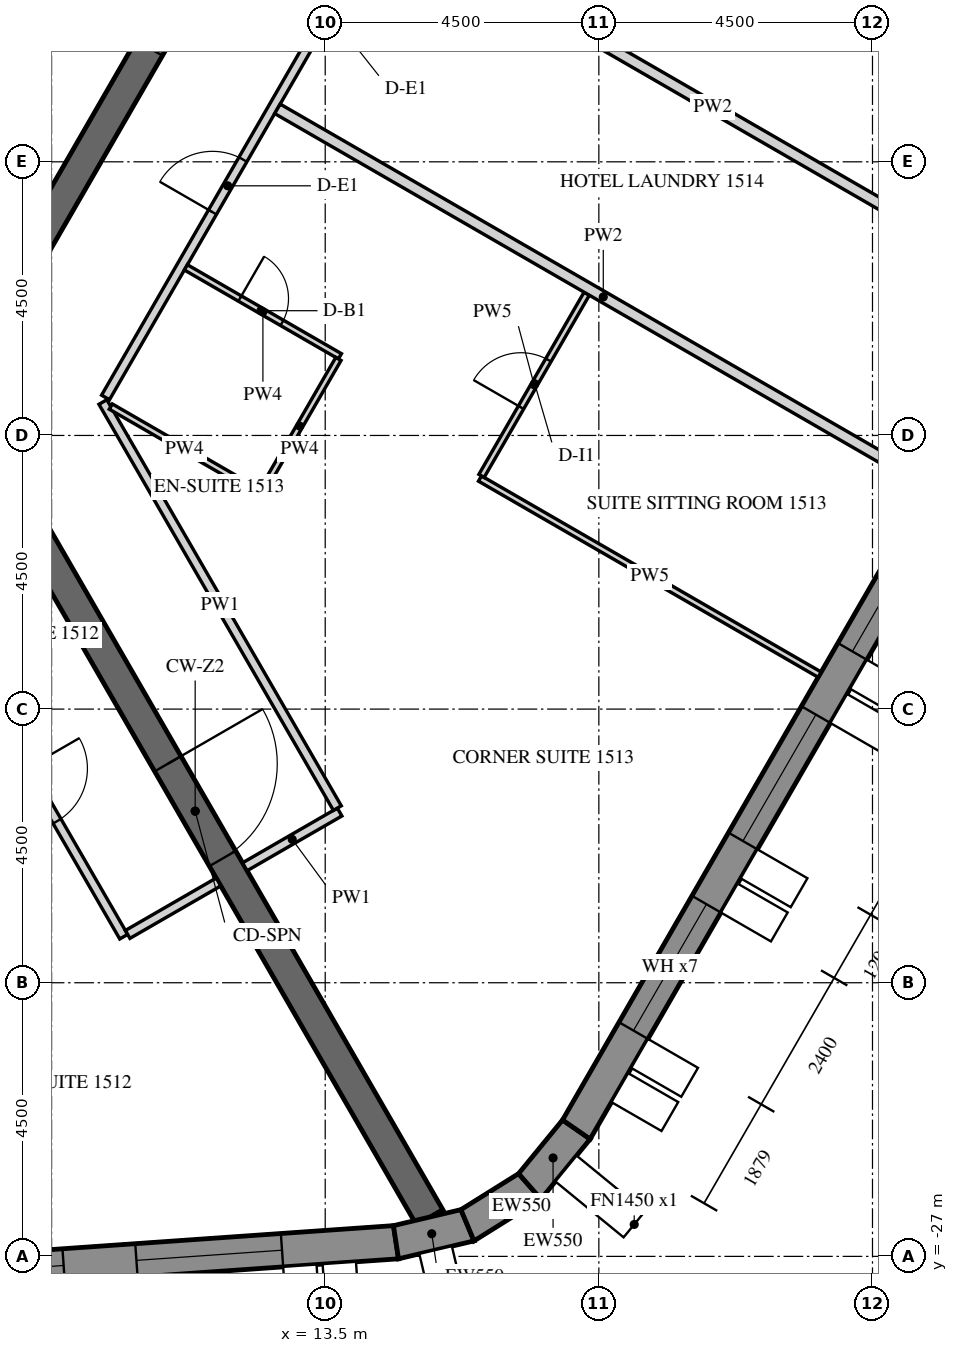
"""IFC4 building model, lengths in metres.
Left out: names, types, materials, properties, quantities, classifications, styles, units other than length and angle.
Written with IfcOpenShell. Run it as: python <this file> out.ifc"""

import sys

from ifc_helpers import new_model, si_unit, direction, frame, frame_2d, origin, place, context, subcontext, project, spatial, polyline, rectangle, outline, extrude, element, fill, save


model = new_model("IFC4")
c1 = context("Model", 3, precision=1e-05, world=origin(), true_north=direction((0.0, 1.0)))
c2 = subcontext(c1, "Body", "Model", "MODEL_VIEW")
j1 = project(units=[si_unit("LENGTHUNIT", "METRE"), si_unit("PLANEANGLEUNIT", "RADIAN")], contexts=[c1])
p1 = place(None, origin())
s1 = spatial("IfcSite", under=j1, at=p1, CompositionType="ELEMENT")
p2 = place(p1, origin())
s2 = spatial("IfcBuilding", under=s1, at=p2, CompositionType="ELEMENT")
p3 = place(p2, frame((0.0, 0.0, 195.6)))
s3 = spatial("IfcBuildingStorey", under=s2, at=p3, CompositionType="ELEMENT", Elevation=195.6)
p4 = place(p3, frame((-13.026, -28.704, -0.15), z_axis=(0.0, 0.0, 1.0), x_axis=(0.99756406806, 0.069756219185, 0.0)))
e1 = element("IfcWall", 1, at=p4, inside=s3, PredefinedType="SOLIDWALL", context=c2, shape_type="SweptSolid", body=[
    extrude(outline(polyline([(-0.026, -0.275), (27.78, -0.275), (27.735, 0.275), (0.026, 0.275), (-0.026, -0.275)])), origin(), (0.0, 0.0, 1.0), 3.9),
])
p5 = place(p4, frame((1.879, 0.0, 1.05)))
e2 = element("IfcOpeningElement", 2, at=p5, cuts=e1, PredefinedType="OPENING", context=c2, shape_type="SweptSolid", body=[
    extrude(rectangle(XDim=2.4, YDim=2.4, at=frame_2d((1.2, 1.2))), frame((0.0, 0.285, 0.0), z_axis=(0.0, -1.0, 0.0), x_axis=(1.0, 0.0, 0.0)), (0.0, 0.0, 1.0), 0.57),
])
p6 = place(p4, frame((5.479, 0.0, 1.05)))
e3 = element("IfcOpeningElement", 3, at=p6, cuts=e1, PredefinedType="OPENING", context=c2, shape_type="SweptSolid", body=[
    extrude(rectangle(XDim=2.4, YDim=2.4, at=frame_2d((1.2, 1.2))), frame((0.0, 0.285, 0.0), z_axis=(0.0, -1.0, 0.0), x_axis=(1.0, 0.0, 0.0)), (0.0, 0.0, 1.0), 0.57),
])
p7 = place(p4, frame((9.079, 0.0, 1.05)))
e4 = element("IfcOpeningElement", 4, at=p7, cuts=e1, PredefinedType="OPENING", context=c2, shape_type="SweptSolid", body=[
    extrude(rectangle(XDim=2.4, YDim=2.4, at=frame_2d((1.2, 1.2))), frame((0.0, 0.285, 0.0), z_axis=(0.0, -1.0, 0.0), x_axis=(1.0, 0.0, 0.0)), (0.0, 0.0, 1.0), 0.57),
])
p8 = place(p4, frame((12.679, 0.0, 1.05)))
e5 = element("IfcOpeningElement", 5, at=p8, cuts=e1, PredefinedType="OPENING", context=c2, shape_type="SweptSolid", body=[
    extrude(rectangle(XDim=2.4, YDim=2.4, at=frame_2d((1.2, 1.2))), frame((0.0, 0.285, 0.0), z_axis=(0.0, -1.0, 0.0), x_axis=(1.0, 0.0, 0.0)), (0.0, 0.0, 1.0), 0.57),
])
p9 = place(p4, frame((16.279, 0.0, 1.05)))
e6 = element("IfcOpeningElement", 6, at=p9, cuts=e1, PredefinedType="OPENING", context=c2, shape_type="SweptSolid", body=[
    extrude(rectangle(XDim=2.4, YDim=2.4, at=frame_2d((1.2, 1.2))), frame((0.0, 0.285, 0.0), z_axis=(0.0, -1.0, 0.0), x_axis=(1.0, 0.0, 0.0)), (0.0, 0.0, 1.0), 0.57),
])
p10 = place(p4, frame((19.879, 0.0, 1.05)))
e7 = element("IfcOpeningElement", 7, at=p10, cuts=e1, PredefinedType="OPENING", context=c2, shape_type="SweptSolid", body=[
    extrude(rectangle(XDim=2.4, YDim=2.4, at=frame_2d((1.2, 1.2))), frame((0.0, 0.285, 0.0), z_axis=(0.0, -1.0, 0.0), x_axis=(1.0, 0.0, 0.0)), (0.0, 0.0, 1.0), 0.57),
])
p11 = place(p4, frame((23.479, 0.0, 1.05)))
e8 = element("IfcOpeningElement", 8, at=p11, cuts=e1, PredefinedType="OPENING", context=c2, shape_type="SweptSolid", body=[
    extrude(rectangle(XDim=2.4, YDim=2.4, at=frame_2d((1.2, 1.2))), frame((0.0, 0.285, 0.0), z_axis=(0.0, -1.0, 0.0), x_axis=(1.0, 0.0, 0.0)), (0.0, 0.0, 1.0), 0.57),
])
p12 = place(p3, frame((14.664, -26.767, -0.15), z_axis=(0.0, 0.0, 1.0), x_axis=(0.973063591128, 0.230536868247, 0.0)))
e9 = element("IfcWall", 9, at=p12, inside=s3, PredefinedType="SOLIDWALL", context=c2, shape_type="SweptSolid", body=[
    extrude(outline(polyline([(-0.022, -0.275), (1.253, -0.275), (1.163, 0.275), (0.022, 0.275), (-0.022, -0.275)])), origin(), (0.0, 0.0, 1.0), 3.9),
])
p13 = place(p3, frame((15.84, -26.489, -0.15), z_axis=(0.0, 0.0, 1.0), x_axis=(0.848009655012, 0.52998077796, 0.0)))
e10 = element("IfcWall", 10, at=p13, inside=s3, PredefinedType="SOLIDWALL", context=c2, shape_type="SweptSolid", body=[
    extrude(outline(polyline([(-0.045, -0.275), (1.253, -0.275), (1.163, 0.275), (0.045, 0.275), (-0.045, -0.275)])), origin(), (0.0, 0.0, 1.0), 3.9),
])
p14 = place(p3, frame((16.864, -25.848, -0.15), z_axis=(0.0, 0.0, 1.0), x_axis=(0.633842757806, 0.773461930787, 0.0)))
e11 = element("IfcWall", 11, at=p14, inside=s3, PredefinedType="SOLIDWALL", context=c2, shape_type="SweptSolid", body=[
    extrude(outline(polyline([(-0.045, -0.275), (1.231, -0.275), (1.186, 0.275), (0.045, 0.275), (-0.045, -0.275)])), origin(), (0.0, 0.0, 1.0), 3.9),
])
p15 = place(p3, frame((17.63, -24.914, -0.15), z_axis=(0.0, 0.0, 1.0), x_axis=(0.499998569178, 0.866026229868, 0.0)))
e12 = element("IfcWall", 12, at=p15, inside=s3, PredefinedType="SOLIDWALL", context=c2, shape_type="SweptSolid", body=[
    extrude(outline(polyline([(-0.022, -0.275), (27.783, -0.275), (27.732, 0.275), (0.022, 0.275), (-0.022, -0.275)])), origin(), (0.0, 0.0, 1.0), 3.9),
])
p16 = place(p15, frame((1.879, 0.0, 1.05)))
e13 = element("IfcOpeningElement", 13, at=p16, cuts=e12, PredefinedType="OPENING", context=c2, shape_type="SweptSolid", body=[
    extrude(rectangle(XDim=2.4, YDim=2.4, at=frame_2d((1.2, 1.2))), frame((0.0, 0.285, 0.0), z_axis=(0.0, -1.0, 0.0), x_axis=(1.0, 0.0, 0.0)), (0.0, 0.0, 1.0), 0.57),
])
p17 = place(p15, frame((5.479, 0.0, 1.05)))
e14 = element("IfcOpeningElement", 14, at=p17, cuts=e12, PredefinedType="OPENING", context=c2, shape_type="SweptSolid", body=[
    extrude(rectangle(XDim=2.4, YDim=2.4, at=frame_2d((1.2, 1.2))), frame((0.0, 0.285, 0.0), z_axis=(0.0, -1.0, 0.0), x_axis=(1.0, 0.0, 0.0)), (0.0, 0.0, 1.0), 0.57),
])
p18 = place(p15, frame((9.079, 0.0, 1.05)))
e15 = element("IfcOpeningElement", 15, at=p18, cuts=e12, PredefinedType="OPENING", context=c2, shape_type="SweptSolid", body=[
    extrude(rectangle(XDim=2.4, YDim=2.4, at=frame_2d((1.2, 1.2))), frame((0.0, 0.285, 0.0), z_axis=(0.0, -1.0, 0.0), x_axis=(1.0, 0.0, 0.0)), (0.0, 0.0, 1.0), 0.57),
])
p19 = place(p15, frame((12.679, 0.0, 1.05)))
e16 = element("IfcOpeningElement", 16, at=p19, cuts=e12, PredefinedType="OPENING", context=c2, shape_type="SweptSolid", body=[
    extrude(rectangle(XDim=2.4, YDim=2.4, at=frame_2d((1.2, 1.2))), frame((0.0, 0.285, 0.0), z_axis=(0.0, -1.0, 0.0), x_axis=(1.0, 0.0, 0.0)), (0.0, 0.0, 1.0), 0.57),
])
p20 = place(p15, frame((16.279, 0.0, 1.05)))
e17 = element("IfcOpeningElement", 17, at=p20, cuts=e12, PredefinedType="OPENING", context=c2, shape_type="SweptSolid", body=[
    extrude(rectangle(XDim=2.4, YDim=2.4, at=frame_2d((1.2, 1.2))), frame((0.0, 0.285, 0.0), z_axis=(0.0, -1.0, 0.0), x_axis=(1.0, 0.0, 0.0)), (0.0, 0.0, 1.0), 0.57),
])
p21 = place(p15, frame((19.879, 0.0, 1.05)))
e18 = element("IfcOpeningElement", 18, at=p21, cuts=e12, PredefinedType="OPENING", context=c2, shape_type="SweptSolid", body=[
    extrude(rectangle(XDim=2.4, YDim=2.4, at=frame_2d((1.2, 1.2))), frame((0.0, 0.285, 0.0), z_axis=(0.0, -1.0, 0.0), x_axis=(1.0, 0.0, 0.0)), (0.0, 0.0, 1.0), 0.57),
])
p22 = place(p15, frame((23.479, 0.0, 1.05)))
e19 = element("IfcOpeningElement", 19, at=p22, cuts=e12, PredefinedType="OPENING", context=c2, shape_type="SweptSolid", body=[
    extrude(rectangle(XDim=2.4, YDim=2.4, at=frame_2d((1.2, 1.2))), frame((0.0, 0.285, 0.0), z_axis=(0.0, -1.0, 0.0), x_axis=(1.0, 0.0, 0.0)), (0.0, 0.0, 1.0), 0.57),
])
p23 = place(p3, frame((7.361, -12.75, -0.15), z_axis=(0.0, 0.0, 1.0), x_axis=(0.50000571537, 0.866022103989, 0.0)))
e20 = element("IfcWall", 20, at=p23, inside=s3, PredefinedType="SHEAR", context=c2, shape_type="SweptSolid", body=[
    extrude(outline(polyline([(-0.144, -0.25), (14.867, -0.25), (14.578, 0.25), (0.144, 0.25), (-0.144, -0.25)])), origin(), (0.0, 0.0, 1.0), 3.9),
])
p24 = place(p23, frame((6.49, 0.0, 0.15)))
e21 = element("IfcOpeningElement", 21, at=p24, cuts=e20, PredefinedType="OPENING", context=c2, shape_type="SweptSolid", body=[
    extrude(rectangle(XDim=1.8, YDim=2.4, at=frame_2d((0.9, 1.2))), frame((0.0, 0.26, 0.0), z_axis=(0.0, -1.0, 0.0), x_axis=(1.0, 0.0, 0.0)), (0.0, 0.0, 1.0), 0.52),
])
p25 = place(p3, frame((7.506, -13.0, -0.15), z_axis=(0.0, 0.0, 1.0), x_axis=(0.499988271576, -0.866032175087, 0.0)))
e22 = element("IfcWall", 22, at=p25, inside=s3, PredefinedType="SHEAR", context=c2, shape_type="SweptSolid", body=[
    extrude(rectangle(XDim=15.424, YDim=0.5, at=frame_2d((7.712, 0.0))), origin(), (0.0, 0.0, 1.0), 3.9),
])
p26 = place(p25, frame((6.812, 0.0, 0.15)))
e23 = element("IfcOpeningElement", 23, at=p26, cuts=e22, PredefinedType="OPENING", context=c2, shape_type="SweptSolid", body=[
    extrude(rectangle(XDim=1.8, YDim=2.4, at=frame_2d((0.9, 1.2))), frame((0.0, 0.26, 0.0), z_axis=(0.0, -1.0, 0.0), x_axis=(1.0, 0.0, 0.0)), (0.0, 0.0, 1.0), 0.52),
])
p27 = place(p3, frame((5.673, -9.825, -0.15), z_axis=(0.0, 0.0, 1.0), x_axis=(0.499995046907, 0.866028263435, 0.0)))
e24 = element("IfcWall", 24, at=p27, inside=s3, PredefinedType="SHEAR", context=c2, shape_type="SweptSolid", body=[
    extrude(outline(polyline([(-0.101, -0.175), (11.446, -0.175), (11.244, 0.175), (0.101, 0.175), (-0.101, -0.175)])), origin(), (0.0, 0.0, 1.0), 3.9),
])
p28 = place(p27, frame((4.801, 0.0, 0.15)))
e25 = element("IfcOpeningElement", 25, at=p28, cuts=e24, PredefinedType="OPENING", context=c2, shape_type="SweptSolid", body=[
    extrude(rectangle(XDim=1.8, YDim=2.4, at=frame_2d((0.9, 1.2))), frame((0.0, 0.185, 0.0), z_axis=(0.0, -1.0, 0.0), x_axis=(1.0, 0.0, 0.0)), (0.0, 0.0, 1.0), 0.37),
])
p29 = place(p3, frame((6.506, -15.368, 0.0), z_axis=(0.0, 0.0, 1.0), x_axis=(0.499995202058, -0.86602817386, 0.0)))
e26 = element("IfcWall", 26, at=p29, inside=s3, PredefinedType="PARTITIONING", context=c2, shape_type="SweptSolid", body=[
    extrude(rectangle(XDim=7.361, YDim=0.15, at=frame_2d((3.68, 0.0))), origin(), (0.0, 0.0, 1.0), 2.988),
])
p30 = place(p29, frame((4.168, 0.0, 0.0)))
e27 = element("IfcOpeningElement", 27, at=p30, cuts=e26, PredefinedType="OPENING", context=c2, shape_type="SweptSolid", body=[
    extrude(rectangle(XDim=1.0, YDim=2.1, at=frame_2d((0.5, 1.05))), frame((0.0, 0.085, 0.0), z_axis=(0.0, -1.0, 0.0), x_axis=(1.0, 0.0, 0.0)), (0.0, 0.0, 1.0), 0.17),
])
p31 = place(p3, frame((10.251, -21.705, 0.0), z_axis=(0.0, 0.0, 1.0), x_axis=(0.866013532718, 0.500020560727, 0.0)))
e28 = element("IfcWall", 28, at=p31, inside=s3, PredefinedType="PARTITIONING", context=c2, shape_type="SweptSolid", body=[
    extrude(rectangle(XDim=1.725, YDim=0.15, at=frame_2d((0.863, 0.0))), origin(), (0.0, 0.0, 1.0), 2.988),
])
p32 = place(p3, frame((12.178, -20.593, 0.0), z_axis=(0.0, 0.0, 1.0), x_axis=(0.866047807691, 0.499961193289, 0.0)))
e29 = element("IfcWall", 29, at=p32, inside=s3, PredefinedType="PARTITIONING", context=c2, shape_type="SweptSolid", body=[
    extrude(rectangle(XDim=1.8, YDim=0.15, at=frame_2d((0.9, 0.0))), origin(), (0.0, 0.0, 1.0), 2.988),
])
p33 = place(p3, frame((13.699, -19.628, 0.0), z_axis=(0.0, 0.0, 1.0), x_axis=(-0.499993780622, 0.866028994514, 0.0)))
e30 = element("IfcWall", 30, at=p33, inside=s3, PredefinedType="PARTITIONING", context=c2, shape_type="SweptSolid", body=[
    extrude(rectangle(XDim=7.711, YDim=0.15, at=frame_2d((3.855, 0.0))), origin(), (0.0, 0.0, 1.0), 2.988),
])
p34 = place(p3, frame((9.887, -12.875, 0.0), z_axis=(0.0, 0.0, 1.0), x_axis=(0.499998228944, 0.866026426302, 0.0)))
e31 = element("IfcWall", 31, at=p34, inside=s3, PredefinedType="PARTITIONING", context=c2, shape_type="SweptSolid", body=[
    extrude(rectangle(XDim=14.867, YDim=0.15, at=frame_2d((7.433, 0.0))), origin(), (0.0, 0.0, 1.0), 2.988),
])
p35 = place(p34, frame((3.519, 0.0, 0.0)))
e32 = element("IfcOpeningElement", 32, at=p35, cuts=e31, PredefinedType="OPENING", context=c2, shape_type="SweptSolid", body=[
    extrude(rectangle(XDim=1.0, YDim=2.1, at=frame_2d((0.5, 1.05))), frame((0.0, 0.085, 0.0), z_axis=(0.0, -1.0, 0.0), x_axis=(1.0, 0.0, 0.0)), (0.0, 0.0, 1.0), 0.17),
])
p36 = place(p34, frame((6.824, 0.0, 0.0)))
e33 = element("IfcOpeningElement", 33, at=p36, cuts=e31, PredefinedType="OPENING", context=c2, shape_type="SweptSolid", body=[
    extrude(rectangle(XDim=1.0, YDim=2.1, at=frame_2d((0.5, 1.05))), frame((0.0, 0.085, 0.0), z_axis=(0.0, -1.0, 0.0), x_axis=(1.0, 0.0, 0.0)), (0.0, 0.0, 1.0), 0.17),
])
p37 = place(p34, frame((10.424, 0.0, 0.0)))
e34 = element("IfcOpeningElement", 34, at=p37, cuts=e31, PredefinedType="OPENING", context=c2, shape_type="SweptSolid", body=[
    extrude(rectangle(XDim=1.0, YDim=2.1, at=frame_2d((0.5, 1.05))), frame((0.0, 0.085, 0.0), z_axis=(0.0, -1.0, 0.0), x_axis=(1.0, 0.0, 0.0)), (0.0, 0.0, 1.0), 0.17),
])
p38 = place(p34, frame((13.667, 0.0, 0.0)))
e35 = element("IfcOpeningElement", 35, at=p38, cuts=e31, PredefinedType="OPENING", context=c2, shape_type="SweptSolid", body=[
    extrude(rectangle(XDim=1.0, YDim=2.1, at=frame_2d((0.5, 1.05))), frame((0.0, 0.085, 0.0), z_axis=(0.0, -1.0, 0.0), x_axis=(1.0, 0.0, 0.0)), (0.0, 0.0, 1.0), 0.17),
])
p39 = place(p3, frame((11.209, -10.736, 0.0), z_axis=(0.0, 0.0, 1.0), x_axis=(0.866046596414, -0.499963291492, 0.0)))
e36 = element("IfcWall", 36, at=p39, inside=s3, PredefinedType="PARTITIONING", context=c2, shape_type="SweptSolid", body=[
    extrude(rectangle(XDim=2.925, YDim=0.1, at=frame_2d((1.462, 0.0))), origin(), (0.0, 0.0, 1.0), 2.988),
])
p40 = place(p39, frame((1.025, 0.0, 0.0)))
e37 = element("IfcOpeningElement", 37, at=p40, cuts=e36, PredefinedType="OPENING", context=c2, shape_type="SweptSolid", body=[
    extrude(rectangle(XDim=0.8, YDim=2.1, at=frame_2d((0.4, 1.05))), frame((0.0, 0.06, 0.0), z_axis=(0.0, -1.0, 0.0), x_axis=(1.0, 0.0, 0.0)), (0.0, 0.0, 1.0), 0.12),
])
p41 = place(p3, frame((13.717, -12.242, 0.0), z_axis=(0.0, 0.0, 1.0), x_axis=(-0.499990435942, -0.866030925526, 0.0)))
e38 = element("IfcWall", 38, at=p41, inside=s3, PredefinedType="PARTITIONING", context=c2, shape_type="SweptSolid", body=[
    extrude(rectangle(XDim=2.55, YDim=0.1, at=frame_2d((1.275, 0.0))), origin(), (0.0, 0.0, 1.0), 2.988),
])
p42 = place(p3, frame((12.399, -14.425, 0.0), z_axis=(0.0, 0.0, 1.0), x_axis=(-0.866018616679, 0.500011755427, 0.0)))
e39 = element("IfcWall", 39, at=p42, inside=s3, PredefinedType="PARTITIONING", context=c2, shape_type="SweptSolid", body=[
    extrude(rectangle(XDim=2.8, YDim=0.1, at=frame_2d((1.4, 0.0))), origin(), (0.0, 0.0, 1.0), 2.988),
])
p43 = place(p3, frame((21.631, -17.433, 0.0), z_axis=(0.0, 0.0, 1.0), x_axis=(-0.86603809205, 0.499978022635, 0.0)))
e40 = element("IfcWall", 40, at=p43, inside=s3, PredefinedType="PARTITIONING", context=c2, shape_type="SweptSolid", body=[
    extrude(rectangle(XDim=6.45, YDim=0.1, at=frame_2d((3.225, 0.0))), origin(), (0.0, 0.0, 1.0), 2.988),
])
p44 = place(p3, frame((16.071, -14.165, 0.0), z_axis=(0.0, 0.0, 1.0), x_axis=(0.500009533716, 0.866019899421, 0.0)))
e41 = element("IfcWall", 41, at=p44, inside=s3, PredefinedType="PARTITIONING", context=c2, shape_type="SweptSolid", body=[
    extrude(rectangle(XDim=3.46, YDim=0.1, at=frame_2d((1.73, 0.0))), origin(), (0.0, 0.0, 1.0), 2.988),
])
p45 = place(p44, frame((1.3, 0.0, 0.0)))
e42 = element("IfcOpeningElement", 42, at=p45, cuts=e41, PredefinedType="OPENING", context=c2, shape_type="SweptSolid", body=[
    extrude(rectangle(XDim=0.9, YDim=2.1, at=frame_2d((0.45, 1.05))), frame((0.0, 0.06, 0.0), z_axis=(0.0, -1.0, 0.0), x_axis=(1.0, 0.0, 0.0)), (0.0, 0.0, 1.0), 0.12),
])
p46 = place(p3, frame((23.431, -14.316, 0.0), z_axis=(0.0, 0.0, 1.0), x_axis=(-0.866024931941, 0.500000817256, 0.0)))
e43 = element("IfcWall", 43, at=p46, inside=s3, PredefinedType="PARTITIONING", context=c2, shape_type="SweptSolid", body=[
    extrude(rectangle(XDim=12.375, YDim=0.18, at=frame_2d((6.188, 0.0))), origin(), (0.0, 0.0, 1.0), 2.988),
])
p47 = place(p3, frame((25.231, -11.198, 0.0), z_axis=(0.0, 0.0, 1.0), x_axis=(-0.866029863972, 0.499992274648, 0.0)))
e44 = element("IfcWall", 44, at=p47, inside=s3, PredefinedType="PARTITIONING", context=c2, shape_type="SweptSolid", body=[
    extrude(rectangle(XDim=12.375, YDim=0.18, at=frame_2d((6.188, 0.0))), origin(), (0.0, 0.0, 1.0), 2.988),
])
p48 = place(p3, frame((27.031, -8.08, 0.0), z_axis=(0.0, 0.0, 1.0), x_axis=(-0.866024931941, 0.500000817256, 0.0)))
e45 = element("IfcWall", 45, at=p48, inside=s3, PredefinedType="PARTITIONING", context=c2, shape_type="SweptSolid", body=[
    extrude(rectangle(XDim=12.375, YDim=0.18, at=frame_2d((6.188, 0.0))), origin(), (0.0, 0.0, 1.0), 2.988),
])
p49 = place(p10, frame((0.0, 0.205, 0.0)))
e46 = element("IfcWindow", 46, at=p49, inside=s3, PartitioningType="DOUBLE_PANEL_VERTICAL", PredefinedType="WINDOW", context=c2, shape_type="SweptSolid", body=[
    extrude(rectangle(XDim=2.4, YDim=2.4, at=frame_2d((1.2, 1.2))), frame((0.0, 0.03, 0.0), z_axis=(0.0, -1.0, 0.0), x_axis=(1.0, 0.0, 0.0)), (0.0, 0.0, 1.0), 0.06),
])
fill(e7, e46)
p50 = place(p11, frame((0.0, 0.205, 0.0)))
e47 = element("IfcWindow", 47, at=p50, inside=s3, PartitioningType="DOUBLE_PANEL_VERTICAL", PredefinedType="WINDOW", context=c2, shape_type="SweptSolid", body=[
    extrude(rectangle(XDim=2.4, YDim=2.4, at=frame_2d((1.2, 1.2))), frame((0.0, 0.03, 0.0), z_axis=(0.0, -1.0, 0.0), x_axis=(1.0, 0.0, 0.0)), (0.0, 0.0, 1.0), 0.06),
])
fill(e8, e47)
p51 = place(p16, frame((0.0, 0.205, 0.0)))
e48 = element("IfcWindow", 48, at=p51, inside=s3, PartitioningType="DOUBLE_PANEL_VERTICAL", PredefinedType="WINDOW", context=c2, shape_type="SweptSolid", body=[
    extrude(rectangle(XDim=2.4, YDim=2.4, at=frame_2d((1.2, 1.2))), frame((0.0, 0.03, 0.0), z_axis=(0.0, -1.0, 0.0), x_axis=(1.0, 0.0, 0.0)), (0.0, 0.0, 1.0), 0.06),
])
fill(e13, e48)
p52 = place(p17, frame((0.0, 0.205, 0.0)))
e49 = element("IfcWindow", 49, at=p52, inside=s3, PartitioningType="DOUBLE_PANEL_VERTICAL", PredefinedType="WINDOW", context=c2, shape_type="SweptSolid", body=[
    extrude(rectangle(XDim=2.4, YDim=2.4, at=frame_2d((1.2, 1.2))), frame((0.0, 0.03, 0.0), z_axis=(0.0, -1.0, 0.0), x_axis=(1.0, 0.0, 0.0)), (0.0, 0.0, 1.0), 0.06),
])
fill(e14, e49)
p53 = place(p18, frame((0.0, 0.205, 0.0)))
e50 = element("IfcWindow", 50, at=p53, inside=s3, PartitioningType="DOUBLE_PANEL_VERTICAL", PredefinedType="WINDOW", context=c2, shape_type="SweptSolid", body=[
    extrude(rectangle(XDim=2.4, YDim=2.4, at=frame_2d((1.2, 1.2))), frame((0.0, 0.03, 0.0), z_axis=(0.0, -1.0, 0.0), x_axis=(1.0, 0.0, 0.0)), (0.0, 0.0, 1.0), 0.06),
])
fill(e15, e50)
p54 = place(p26, origin())
e51 = element("IfcDoor", 51, at=p54, inside=s3, OperationType="DOUBLE_DOOR_SINGLE_SWING", PredefinedType="DOOR", context=c2, shape_type="SweptSolid", body=[
    extrude(rectangle(XDim=1.8, YDim=2.4, at=frame_2d((0.9, 1.2))), frame((0.0, 0.025, 0.0), z_axis=(0.0, -1.0, 0.0), x_axis=(1.0, 0.0, 0.0)), (0.0, 0.0, 1.0), 0.05),
])
fill(e23, e51)
p55 = place(p30, origin())
e52 = element("IfcDoor", 52, at=p55, inside=s3, OperationType="SINGLE_SWING_RIGHT", PredefinedType="DOOR", context=c2, shape_type="SweptSolid", body=[
    extrude(rectangle(XDim=1.0, YDim=2.1, at=frame_2d((0.5, 1.05))), frame((0.0, 0.025, 0.0), z_axis=(0.0, -1.0, 0.0), x_axis=(1.0, 0.0, 0.0)), (0.0, 0.0, 1.0), 0.05),
])
fill(e27, e52)
p56 = place(p35, origin())
e53 = element("IfcDoor", 53, at=p56, inside=s3, OperationType="SINGLE_SWING_RIGHT", PredefinedType="DOOR", context=c2, shape_type="SweptSolid", body=[
    extrude(rectangle(XDim=1.0, YDim=2.1, at=frame_2d((0.5, 1.05))), frame((0.0, 0.025, 0.0), z_axis=(0.0, -1.0, 0.0), x_axis=(1.0, 0.0, 0.0)), (0.0, 0.0, 1.0), 0.05),
])
fill(e32, e53)
p57 = place(p40, origin())
e54 = element("IfcDoor", 54, at=p57, inside=s3, OperationType="SINGLE_SWING_RIGHT", PredefinedType="DOOR", context=c2, shape_type="SweptSolid", body=[
    extrude(rectangle(XDim=0.8, YDim=2.1, at=frame_2d((0.4, 1.05))), frame((0.0, 0.025, 0.0), z_axis=(0.0, -1.0, 0.0), x_axis=(1.0, 0.0, 0.0)), (0.0, 0.0, 1.0), 0.05),
])
fill(e37, e54)
p58 = place(p45, origin())
e55 = element("IfcDoor", 55, at=p58, inside=s3, OperationType="SINGLE_SWING_LEFT", PredefinedType="DOOR", context=c2, shape_type="SweptSolid", body=[
    extrude(rectangle(XDim=0.9, YDim=2.1, at=frame_2d((0.45, 1.05))), frame((0.0, 0.025, 0.0), z_axis=(0.0, -1.0, 0.0), x_axis=(1.0, 0.0, 0.0)), (0.0, 0.0, 1.0), 0.05),
])
fill(e42, e55)
save(model, sys.argv[1])
